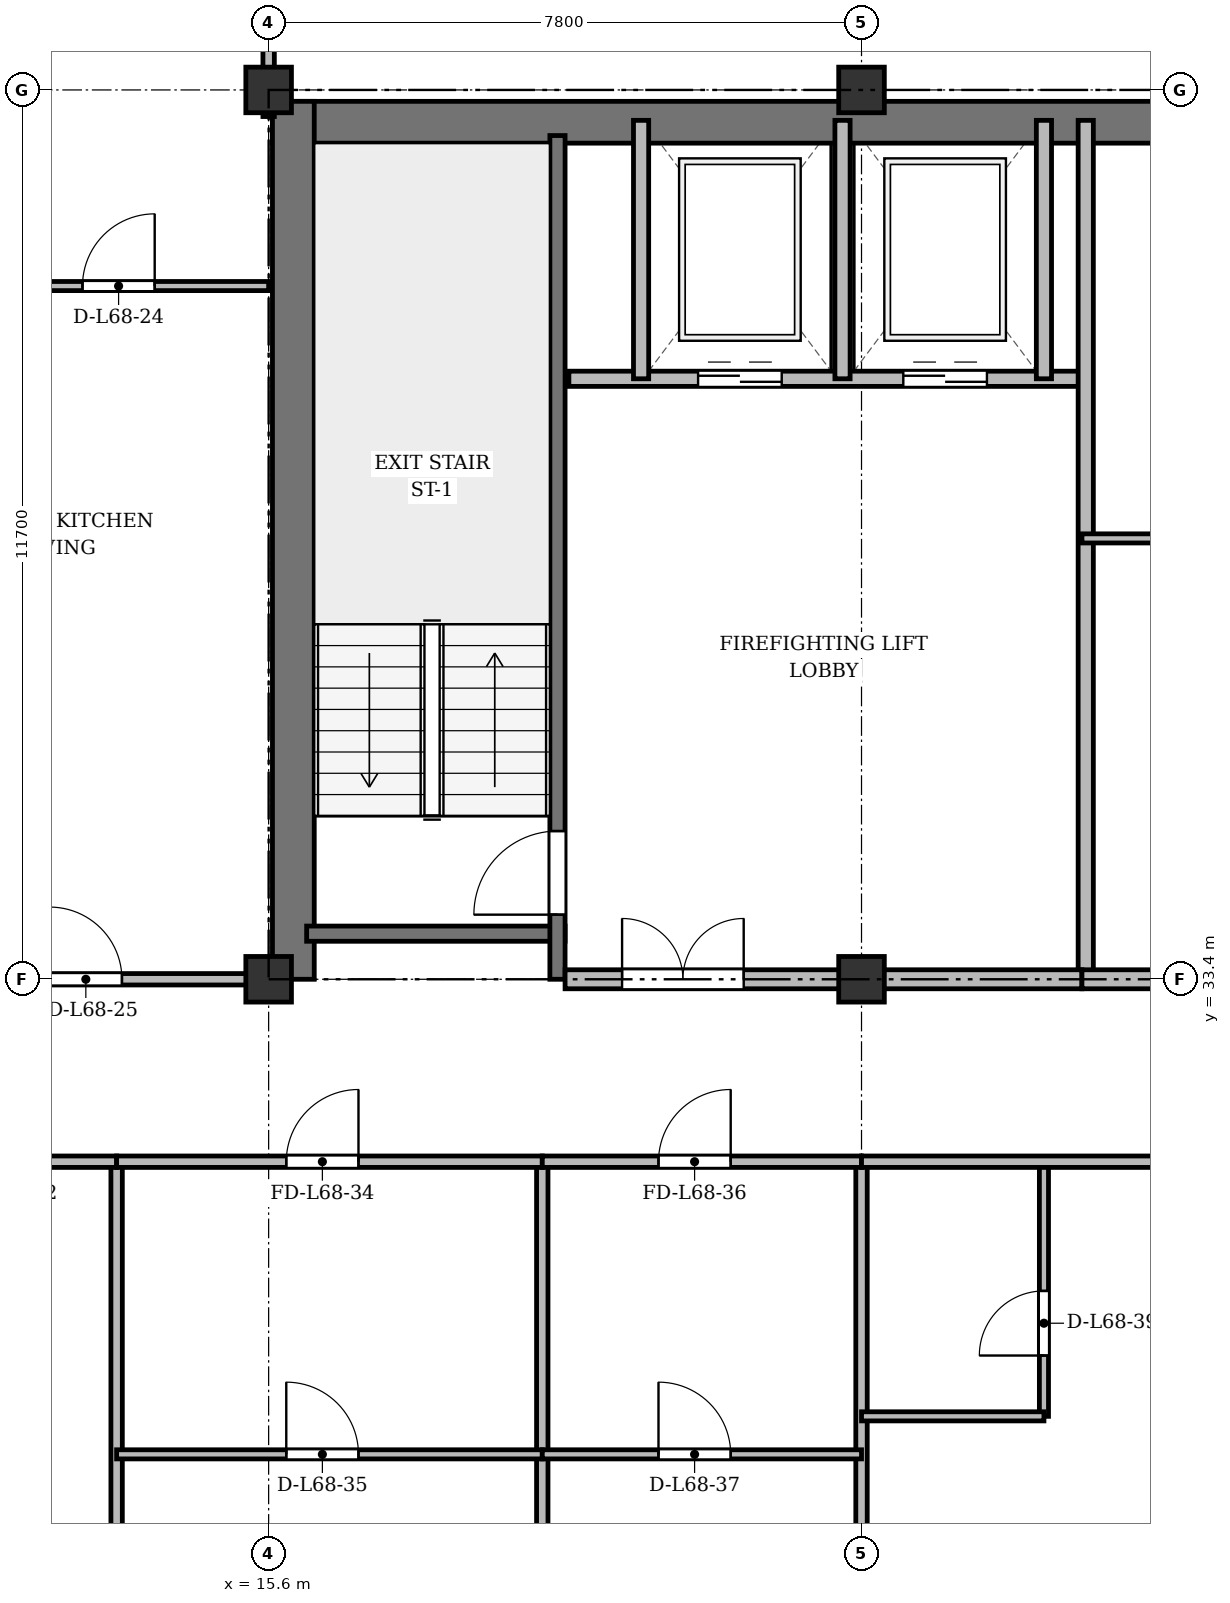
"""IFC4 building model, lengths in metres.
Left out: names, types, materials, properties, quantities, classifications, styles, units other than length and angle.
Written with IfcOpenShell. Run it as: python <this file> out.ifc"""

import sys

from ifc_helpers import new_model, si_unit, direction, frame, frame_2d, origin, origin_2d, place, context, subcontext, project, spatial, rectangle, extrude, source, transform, mapped, element, fill, save


model = new_model("IFC4")
c1 = context("Model", 3, precision=1e-05, world=origin(), true_north=direction((0.0, 1.0)))
c2 = subcontext(c1, "Body", "Model", "MODEL_VIEW")
j1 = project(units=[si_unit("LENGTHUNIT", "METRE"), si_unit("PLANEANGLEUNIT", "RADIAN")], contexts=[c1])
p1 = place(None, origin())
s1 = spatial("IfcSite", under=j1, at=p1, CompositionType="ELEMENT")
p2 = place(p1, origin())
s2 = spatial("IfcBuilding", under=s1, at=p2, CompositionType="ELEMENT")
p3 = place(p2, frame((0.0, 0.0, 263.1)))
s3 = spatial("IfcBuildingStorey", under=s2, at=p3, CompositionType="ELEMENT", Elevation=263.1)
m1 = source(origin(), c2, "Body", "SweptSolid", [
    extrude(rectangle(XDim=0.6, YDim=0.6, at=origin_2d()), origin(), (0.0, 0.0, 1.0), 3.6),
])
for number, where, z_axis, x_axis in (
    (1, (15.6, 33.4, 0.0), (0.0, 0.0, 1.0), (1.0, 0.0, 0.0)),
    (2, (15.6, 45.1, 0.0), (0.0, 0.0, 1.0), (1.0, 0.0, 0.0)),
    (3, (23.4, 33.4, 0.0), (0.0, 0.0, 1.0), (1.0, 0.0, 0.0)),
    (4, (23.4, 45.1, 0.0), (0.0, 0.0, 1.0), (1.0, 0.0, 0.0)),
):
    element("IfcColumn", number, at=place(p3, frame(where, z_axis=z_axis, x_axis=x_axis)), inside=s3, PredefinedType="COLUMN", context=c2, shape_type="MappedRepresentation", body=[
        mapped(m1, transform((0.0, 0.0, 0.0), x_axis=(1.0, 0.0, 0.0), y_axis=(0.0, 1.0, 0.0), z_axis=(0.0, 0.0, 1.0), scale=1.0)),
    ])
p4 = place(p3, frame((15.65, 44.675, 0.0), z_axis=(0.0, 0.0, 1.0), x_axis=(1.0, 0.0, 0.0)))
e5 = element("IfcWall", 5, at=p4, inside=s3, PredefinedType="SHEAR", context=c2, shape_type="SweptSolid", body=[
    extrude(rectangle(XDim=43.1, YDim=0.55, at=frame_2d((21.55, 0.0))), origin(), (0.0, 0.0, 1.0), 3.37),
])
p5 = place(p3, frame((15.925, 33.4, 0.0), z_axis=(0.0, 0.0, 1.0), x_axis=(0.0, 1.0, 0.0)))
e6 = element("IfcWall", 6, at=p5, inside=s3, PredefinedType="SHEAR", context=c2, shape_type="SweptSolid", body=[
    extrude(rectangle(XDim=11.55, YDim=0.55, at=frame_2d((5.775, 0.0))), origin(), (0.0, 0.0, 1.0), 3.37),
])
p6 = place(p3, frame((16.1, 34.0, 0.0), z_axis=(0.0, 0.0, 1.0), x_axis=(1.0, 0.0, 0.0)))
e7 = element("IfcWall", 7, at=p6, inside=s3, PredefinedType="SHEAR", context=c2, shape_type="SweptSolid", body=[
    extrude(rectangle(XDim=3.4, YDim=0.2, at=frame_2d((1.7, 0.0))), origin(), (0.0, 0.0, 1.0), 3.37),
])
p7 = place(p3, frame((19.4, 33.4, 0.0), z_axis=(0.0, 0.0, 1.0), x_axis=(0.0, 1.0, 0.0)))
e8 = element("IfcWall", 8, at=p7, inside=s3, PredefinedType="SHEAR", context=c2, shape_type="SweptSolid", body=[
    extrude(rectangle(XDim=11.1, YDim=0.2, at=frame_2d((5.55, 0.0))), origin(), (0.0, 0.0, 1.0), 3.37),
])
p8 = place(p7, frame((0.85, 0.0, 0.0)))
e9 = element("IfcOpeningElement", 9, at=p8, cuts=e8, PredefinedType="OPENING", context=c2, shape_type="SweptSolid", body=[
    extrude(rectangle(XDim=1.1, YDim=2.15, at=frame_2d((0.55, 1.075))), frame((0.0, 0.11, 0.0), z_axis=(0.0, -1.0, 0.0), x_axis=(1.0, 0.0, 0.0)), (0.0, 0.0, 1.0), 0.22),
])
p9 = place(p3, frame((19.55, 41.3, 0.0), z_axis=(0.0, 0.0, 1.0), x_axis=(1.0, 0.0, 0.0)))
e10 = element("IfcWall", 10, at=p9, inside=s3, PredefinedType="SOLIDWALL", context=c2, shape_type="SweptSolid", body=[
    extrude(rectangle(XDim=6.75, YDim=0.2, at=frame_2d((3.375, 0.0))), origin(), (0.0, 0.0, 1.0), 3.37),
])
p10 = place(p9, frame((1.7, 0.0, 0.0)))
e11 = element("IfcOpeningElement", 11, at=p10, cuts=e10, PredefinedType="OPENING", context=c2, shape_type="SweptSolid", body=[
    extrude(rectangle(XDim=1.1, YDim=2.15, at=frame_2d((0.55, 1.075))), frame((0.0, 0.11, 0.0), z_axis=(0.0, -1.0, 0.0), x_axis=(1.0, 0.0, 0.0)), (0.0, 0.0, 1.0), 0.22),
])
p11 = place(p9, frame((4.4, 0.0, 0.0)))
e12 = element("IfcOpeningElement", 12, at=p11, cuts=e10, PredefinedType="OPENING", context=c2, shape_type="SweptSolid", body=[
    extrude(rectangle(XDim=1.1, YDim=2.15, at=frame_2d((0.55, 1.075))), frame((0.0, 0.11, 0.0), z_axis=(0.0, -1.0, 0.0), x_axis=(1.0, 0.0, 0.0)), (0.0, 0.0, 1.0), 0.22),
])
for number, where, z_axis, x_axis in (
    (13, (20.5, 41.3, 0.0), (0.0, 0.0, 1.0), (0.0, 1.0, 0.0)),
    (14, (23.15, 41.3, 0.0), (0.0, 0.0, 1.0), (0.0, 1.0, 0.0)),
    (15, (25.8, 41.3, 0.0), (0.0, 0.0, 1.0), (0.0, 1.0, 0.0)),
):
    element("IfcWall", number, at=place(p3, frame(where, z_axis=z_axis, x_axis=x_axis)), inside=s3, PredefinedType="SOLIDWALL", context=c2, shape_type="SweptSolid", body=[
        extrude(rectangle(XDim=3.4, YDim=0.2, at=frame_2d((1.7, 0.0))), origin(), (0.0, 0.0, 1.0), 3.37),
    ])
p12 = place(p3, frame((26.35, 33.4, 0.0), z_axis=(0.0, 0.0, 1.0), x_axis=(0.0, 1.0, 0.0)))
e16 = element("IfcWall", 16, at=p12, inside=s3, PredefinedType="SOLIDWALL", context=c2, shape_type="SweptSolid", body=[
    extrude(rectangle(XDim=11.3, YDim=0.2, at=frame_2d((5.65, 0.0))), origin(), (0.0, 0.0, 1.0), 2.92),
])
p13 = place(p3, frame((19.5, 33.4, 0.0), z_axis=(0.0, 0.0, 1.0), x_axis=(1.0, 0.0, 0.0)))
e17 = element("IfcWall", 17, at=p13, inside=s3, PredefinedType="PARTITIONING", context=c2, shape_type="SweptSolid", body=[
    extrude(rectangle(XDim=6.8, YDim=0.25, at=frame_2d((3.4, 0.0))), origin(), (0.0, 0.0, 1.0), 2.92),
])
p14 = place(p13, frame((0.75, 0.0, 0.0)))
e18 = element("IfcOpeningElement", 18, at=p14, cuts=e17, PredefinedType="OPENING", context=c2, shape_type="SweptSolid", body=[
    extrude(rectangle(XDim=1.6, YDim=2.2, at=frame_2d((0.8, 1.1))), frame((0.0, 0.135, 0.0), z_axis=(0.0, -1.0, 0.0), x_axis=(1.0, 0.0, 0.0)), (0.0, 0.0, 1.0), 0.27),
])
p15 = place(p3, frame((26.3, 39.2, 0.0), z_axis=(0.0, 0.0, 1.0), x_axis=(1.0, 0.0, 0.0)))
e19 = element("IfcWall", 19, at=p15, inside=s3, PredefinedType="PARTITIONING", context=c2, shape_type="SweptSolid", body=[
    extrude(rectangle(XDim=7.0, YDim=0.12, at=frame_2d((3.5, 0.0))), origin(), (0.0, 0.0, 1.0), 2.87),
])
p16 = place(p15, frame((2.6, 0.0, 0.0)))
e20 = element("IfcOpeningElement", 20, at=p16, cuts=e19, PredefinedType="OPENING", context=c2, shape_type="SweptSolid", body=[
    extrude(rectangle(XDim=0.95, YDim=2.15, at=frame_2d((0.475, 1.075))), frame((0.0, 0.07, 0.0), z_axis=(0.0, -1.0, 0.0), x_axis=(1.0, 0.0, 0.0)), (0.0, 0.0, 1.0), 0.14),
])
p17 = place(p3, frame((26.3, 33.4, 0.0), z_axis=(0.0, 0.0, 1.0), x_axis=(1.0, 0.0, 0.0)))
e21 = element("IfcWall", 21, at=p17, inside=s3, PredefinedType="PARTITIONING", context=c2, shape_type="SweptSolid", body=[
    extrude(rectangle(XDim=7.0, YDim=0.25, at=frame_2d((3.5, 0.0))), origin(), (0.0, 0.0, 1.0), 2.92),
])
p18 = place(p17, frame((1.35, 0.0, 0.0)))
e22 = element("IfcOpeningElement", 22, at=p18, cuts=e21, PredefinedType="OPENING", context=c2, shape_type="SweptSolid", body=[
    extrude(rectangle(XDim=0.95, YDim=2.15, at=frame_2d((0.475, 1.075))), frame((0.0, 0.135, 0.0), z_axis=(0.0, -1.0, 0.0), x_axis=(1.0, 0.0, 0.0)), (0.0, 0.0, 1.0), 0.27),
])
p19 = place(p3, frame((12.025, 42.52, 0.0), z_axis=(0.0, 0.0, 1.0), x_axis=(1.0, 0.0, 0.0)))
e23 = element("IfcWall", 23, at=p19, inside=s3, PredefinedType="PARTITIONING", context=c2, shape_type="SweptSolid", body=[
    extrude(rectangle(XDim=3.575, YDim=0.12, at=frame_2d((1.788, 0.0))), origin(), (0.0, 0.0, 1.0), 2.87),
])
p20 = place(p19, frame((1.126, 0.0, 0.0)))
e24 = element("IfcOpeningElement", 24, at=p20, cuts=e23, PredefinedType="OPENING", context=c2, shape_type="SweptSolid", body=[
    extrude(rectangle(XDim=0.95, YDim=2.15, at=frame_2d((0.475, 1.075))), frame((0.0, 0.07, 0.0), z_axis=(0.0, -1.0, 0.0), x_axis=(1.0, 0.0, 0.0)), (0.0, 0.0, 1.0), 0.14),
])
p21 = place(p3, frame((8.45, 33.4, 0.0), z_axis=(0.0, 0.0, 1.0), x_axis=(1.0, 0.0, 0.0)))
e25 = element("IfcWall", 25, at=p21, inside=s3, PredefinedType="PARTITIONING", context=c2, shape_type="SweptSolid", body=[
    extrude(rectangle(XDim=7.15, YDim=0.15, at=frame_2d((3.575, 0.0))), origin(), (0.0, 0.0, 1.0), 2.92),
])
p22 = place(p21, frame((4.27, 0.0, 0.0)))
e26 = element("IfcOpeningElement", 26, at=p22, cuts=e25, PredefinedType="OPENING", context=c2, shape_type="SweptSolid", body=[
    extrude(rectangle(XDim=0.95, YDim=2.15, at=frame_2d((0.475, 1.075))), frame((0.0, 0.085, 0.0), z_axis=(0.0, -1.0, 0.0), x_axis=(1.0, 0.0, 0.0)), (0.0, 0.0, 1.0), 0.17),
])
p23 = place(p3, frame((15.6, 44.75, 0.0), z_axis=(0.0, 0.0, 1.0), x_axis=(0.0, 1.0, 0.0)))
e27 = element("IfcWall", 27, at=p23, inside=s3, PredefinedType="PARTITIONING", context=c2, shape_type="SweptSolid", body=[
    extrude(rectangle(XDim=3.61, YDim=0.15, at=frame_2d((1.805, 0.0))), origin(), (0.0, 0.0, 1.0), 2.87),
])
p24 = place(p23, frame((1.1, 0.0, 0.0)))
e28 = element("IfcOpeningElement", 28, at=p24, cuts=e27, PredefinedType="OPENING", context=c2, shape_type="SweptSolid", body=[
    extrude(rectangle(XDim=0.95, YDim=2.15, at=frame_2d((0.475, 1.075))), frame((0.0, 0.085, 0.0), z_axis=(0.0, -1.0, 0.0), x_axis=(1.0, 0.0, 0.0)), (0.0, 0.0, 1.0), 0.17),
])
for number, where, z_axis, x_axis in (
    (29, (13.6, 3.725, 0.0), (0.0, 0.0, 1.0), (0.0, 1.0, 0.0)),
    (30, (19.2, 3.725, 0.0), (0.0, 0.0, 1.0), (0.0, 1.0, 0.0)),
):
    element("IfcWall", number, at=place(p3, frame(where, z_axis=z_axis, x_axis=x_axis)), inside=s3, PredefinedType="PARTITIONING", context=c2, shape_type="SweptSolid", body=[
        extrude(rectangle(XDim=27.275, YDim=0.15, at=frame_2d((13.637, 0.0))), origin(), (0.0, 0.0, 1.0), 2.92),
    ])
p25 = place(p3, frame((23.4, 3.725, 0.0), z_axis=(0.0, 0.0, 1.0), x_axis=(0.0, 1.0, 0.0)))
e31 = element("IfcWall", 31, at=p25, inside=s3, PredefinedType="PARTITIONING", context=c2, shape_type="SweptSolid", body=[
    extrude(rectangle(XDim=27.275, YDim=0.15, at=frame_2d((13.637, 0.0))), origin(), (0.0, 0.0, 1.0), 2.87),
])
p26 = place(p3, frame((8.425, 31.0, 0.0), z_axis=(0.0, 0.0, 1.0), x_axis=(1.0, 0.0, 0.0)))
e32 = element("IfcWall", 32, at=p26, inside=s3, PredefinedType="PARTITIONING", context=c2, shape_type="SweptSolid", body=[
    extrude(rectangle(XDim=5.175, YDim=0.15, at=frame_2d((2.587, 0.0))), origin(), (0.0, 0.0, 1.0), 2.87),
])
p27 = place(p26, frame((3.244, 0.0, 0.0)))
e33 = element("IfcOpeningElement", 33, at=p27, cuts=e32, PredefinedType="OPENING", context=c2, shape_type="SweptSolid", body=[
    extrude(rectangle(XDim=0.95, YDim=2.15, at=frame_2d((0.475, 1.075))), frame((0.0, 0.085, 0.0), z_axis=(0.0, -1.0, 0.0), x_axis=(1.0, 0.0, 0.0)), (0.0, 0.0, 1.0), 0.17),
])
p28 = place(p3, frame((13.6, 31.0, 0.0), z_axis=(0.0, 0.0, 1.0), x_axis=(1.0, 0.0, 0.0)))
e34 = element("IfcWall", 34, at=p28, inside=s3, PredefinedType="PARTITIONING", context=c2, shape_type="SweptSolid", body=[
    extrude(rectangle(XDim=5.6, YDim=0.15, at=frame_2d((2.8, 0.0))), origin(), (0.0, 0.0, 1.0), 2.87),
])
p29 = place(p28, frame((2.232, 0.0, 0.0)))
e35 = element("IfcOpeningElement", 35, at=p29, cuts=e34, PredefinedType="OPENING", context=c2, shape_type="SweptSolid", body=[
    extrude(rectangle(XDim=0.95, YDim=2.15, at=frame_2d((0.475, 1.075))), frame((0.0, 0.085, 0.0), z_axis=(0.0, -1.0, 0.0), x_axis=(1.0, 0.0, 0.0)), (0.0, 0.0, 1.0), 0.17),
])
p30 = place(p3, frame((13.6, 27.15, 0.0), z_axis=(0.0, 0.0, 1.0), x_axis=(1.0, 0.0, 0.0)))
e36 = element("IfcWall", 36, at=p30, inside=s3, PredefinedType="PARTITIONING", context=c2, shape_type="SweptSolid", body=[
    extrude(rectangle(XDim=5.6, YDim=0.12, at=frame_2d((2.8, 0.0))), origin(), (0.0, 0.0, 1.0), 2.87),
])
p31 = place(p30, frame((2.232, 0.0, 0.0)))
e37 = element("IfcOpeningElement", 37, at=p31, cuts=e36, PredefinedType="OPENING", context=c2, shape_type="SweptSolid", body=[
    extrude(rectangle(XDim=0.95, YDim=2.15, at=frame_2d((0.475, 1.075))), frame((0.0, 0.07, 0.0), z_axis=(0.0, -1.0, 0.0), x_axis=(1.0, 0.0, 0.0)), (0.0, 0.0, 1.0), 0.14),
])
p32 = place(p3, frame((19.2, 31.0, 0.0), z_axis=(0.0, 0.0, 1.0), x_axis=(1.0, 0.0, 0.0)))
e38 = element("IfcWall", 38, at=p32, inside=s3, PredefinedType="PARTITIONING", context=c2, shape_type="SweptSolid", body=[
    extrude(rectangle(XDim=4.2, YDim=0.15, at=frame_2d((2.1, 0.0))), origin(), (0.0, 0.0, 1.0), 2.87),
])
p33 = place(p32, frame((1.529, 0.0, 0.0)))
e39 = element("IfcOpeningElement", 39, at=p33, cuts=e38, PredefinedType="OPENING", context=c2, shape_type="SweptSolid", body=[
    extrude(rectangle(XDim=0.95, YDim=2.15, at=frame_2d((0.475, 1.075))), frame((0.0, 0.085, 0.0), z_axis=(0.0, -1.0, 0.0), x_axis=(1.0, 0.0, 0.0)), (0.0, 0.0, 1.0), 0.17),
])
p34 = place(p3, frame((19.2, 27.15, 0.0), z_axis=(0.0, 0.0, 1.0), x_axis=(1.0, 0.0, 0.0)))
e40 = element("IfcWall", 40, at=p34, inside=s3, PredefinedType="PARTITIONING", context=c2, shape_type="SweptSolid", body=[
    extrude(rectangle(XDim=4.2, YDim=0.12, at=frame_2d((2.1, 0.0))), origin(), (0.0, 0.0, 1.0), 2.87),
])
p35 = place(p34, frame((1.529, 0.0, 0.0)))
e41 = element("IfcOpeningElement", 41, at=p35, cuts=e40, PredefinedType="OPENING", context=c2, shape_type="SweptSolid", body=[
    extrude(rectangle(XDim=0.95, YDim=2.15, at=frame_2d((0.475, 1.075))), frame((0.0, 0.07, 0.0), z_axis=(0.0, -1.0, 0.0), x_axis=(1.0, 0.0, 0.0)), (0.0, 0.0, 1.0), 0.14),
])
p36 = place(p3, frame((25.8, 27.65, 0.0), z_axis=(0.0, 0.0, 1.0), x_axis=(0.0, 1.0, 0.0)))
e42 = element("IfcWall", 42, at=p36, inside=s3, PredefinedType="PARTITIONING", context=c2, shape_type="SweptSolid", body=[
    extrude(rectangle(XDim=3.35, YDim=0.12, at=frame_2d((1.675, 0.0))), origin(), (0.0, 0.0, 1.0), 3.37),
])
p37 = place(p36, frame((0.8, 0.0, 0.0)))
e43 = element("IfcOpeningElement", 43, at=p37, cuts=e42, PredefinedType="OPENING", context=c2, shape_type="SweptSolid", body=[
    extrude(rectangle(XDim=0.85, YDim=2.1, at=frame_2d((0.425, 1.05))), frame((0.0, 0.07, 0.0), z_axis=(0.0, -1.0, 0.0), x_axis=(1.0, 0.0, 0.0)), (0.0, 0.0, 1.0), 0.14),
])
p38 = place(p3, frame((23.4, 27.65, 0.0), z_axis=(0.0, 0.0, 1.0), x_axis=(1.0, 0.0, 0.0)))
e44 = element("IfcWall", 44, at=p38, inside=s3, PredefinedType="PARTITIONING", context=c2, shape_type="SweptSolid", body=[
    extrude(rectangle(XDim=2.4, YDim=0.12, at=frame_2d((1.2, 0.0))), origin(), (0.0, 0.0, 1.0), 2.87),
])
p39 = place(p3, frame((23.4, 31.0, 0.0), z_axis=(0.0, 0.0, 1.0), x_axis=(1.0, 0.0, 0.0)))
e45 = element("IfcWall", 45, at=p39, inside=s3, PredefinedType="PARTITIONING", context=c2, shape_type="SweptSolid", body=[
    extrude(rectangle(XDim=7.2, YDim=0.15, at=frame_2d((3.6, 0.0))), origin(), (0.0, 0.0, 1.0), 2.87),
])
p40 = place(p39, frame((4.706, 0.0, 0.0)))
e46 = element("IfcOpeningElement", 46, at=p40, cuts=e45, PredefinedType="OPENING", context=c2, shape_type="SweptSolid", body=[
    extrude(rectangle(XDim=0.95, YDim=2.15, at=frame_2d((0.475, 1.075))), frame((0.0, 0.085, 0.0), z_axis=(0.0, -1.0, 0.0), x_axis=(1.0, 0.0, 0.0)), (0.0, 0.0, 1.0), 0.17),
])
m2 = source(origin(), c2, "Body", "SweptSolid", [
    extrude(rectangle(XDim=1.1, YDim=2.15, at=frame_2d((0.55, 1.075))), frame((0.0, 0.025, 0.0), z_axis=(0.0, -1.0, 0.0), x_axis=(1.0, 0.0, 0.0)), (0.0, 0.0, 1.0), 0.05),
])
p41 = place(p8, origin())
e47 = element("IfcDoor", 47, at=p41, inside=s3, OperationType="SINGLE_SWING_LEFT", PredefinedType="DOOR", context=c2, shape_type="MappedRepresentation", body=[
    mapped(m2, transform((0.0, 0.0, 0.0), x_axis=(1.0, 0.0, 0.0), y_axis=(0.0, 1.0, 0.0), z_axis=(0.0, 0.0, 1.0), scale=1.0)),
])
fill(e9, e47)
p42 = place(p10, origin())
e48 = element("IfcDoor", 48, at=p42, inside=s3, OperationType="DOUBLE_DOOR_SLIDING", PredefinedType="DOOR", context=c2, shape_type="MappedRepresentation", body=[
    mapped(m2, transform((0.0, 0.0, 0.0), x_axis=(1.0, 0.0, 0.0), y_axis=(0.0, 1.0, 0.0), z_axis=(0.0, 0.0, 1.0), scale=1.0)),
])
fill(e11, e48)
p43 = place(p11, origin())
e49 = element("IfcDoor", 49, at=p43, inside=s3, OperationType="DOUBLE_DOOR_SLIDING", PredefinedType="DOOR", context=c2, shape_type="MappedRepresentation", body=[
    mapped(m2, transform((0.0, 0.0, 0.0), x_axis=(1.0, 0.0, 0.0), y_axis=(0.0, 1.0, 0.0), z_axis=(0.0, 0.0, 1.0), scale=1.0)),
])
fill(e12, e49)
m3 = source(origin(), c2, "Body", "SweptSolid", [
    extrude(rectangle(XDim=1.6, YDim=2.2, at=frame_2d((0.8, 1.1))), frame((0.0, 0.025, 0.0), z_axis=(0.0, -1.0, 0.0), x_axis=(1.0, 0.0, 0.0)), (0.0, 0.0, 1.0), 0.05),
])
p44 = place(p14, origin())
e50 = element("IfcDoor", 50, at=p44, inside=s3, OperationType="DOUBLE_DOOR_SINGLE_SWING", PredefinedType="DOOR", context=c2, shape_type="MappedRepresentation", body=[
    mapped(m3, transform((0.0, 0.0, 0.0), x_axis=(1.0, 0.0, 0.0), y_axis=(0.0, 1.0, 0.0), z_axis=(0.0, 0.0, 1.0), scale=1.0)),
])
fill(e18, e50)
m4 = source(origin(), c2, "Body", "SweptSolid", [
    extrude(rectangle(XDim=0.95, YDim=2.15, at=frame_2d((0.475, 1.075))), frame((0.0, 0.025, 0.0), z_axis=(0.0, -1.0, 0.0), x_axis=(1.0, 0.0, 0.0)), (0.0, 0.0, 1.0), 0.05),
])
p45 = place(p20, origin())
e51 = element("IfcDoor", 51, at=p45, inside=s3, OperationType="SINGLE_SWING_RIGHT", PredefinedType="DOOR", context=c2, shape_type="MappedRepresentation", body=[
    mapped(m4, transform((0.0, 0.0, 0.0), x_axis=(1.0, 0.0, 0.0), y_axis=(0.0, 1.0, 0.0), z_axis=(0.0, 0.0, 1.0), scale=1.0)),
])
fill(e24, e51)
p46 = place(p22, origin())
e52 = element("IfcDoor", 52, at=p46, inside=s3, OperationType="SINGLE_SWING_LEFT", PredefinedType="DOOR", context=c2, shape_type="MappedRepresentation", body=[
    mapped(m4, transform((0.0, 0.0, 0.0), x_axis=(1.0, 0.0, 0.0), y_axis=(0.0, 1.0, 0.0), z_axis=(0.0, 0.0, 1.0), scale=1.0)),
])
fill(e26, e52)
p47 = place(p29, origin())
e53 = element("IfcDoor", 53, at=p47, inside=s3, OperationType="SINGLE_SWING_RIGHT", PredefinedType="DOOR", context=c2, shape_type="MappedRepresentation", body=[
    mapped(m4, transform((0.0, 0.0, 0.0), x_axis=(1.0, 0.0, 0.0), y_axis=(0.0, 1.0, 0.0), z_axis=(0.0, 0.0, 1.0), scale=1.0)),
])
fill(e35, e53)
p48 = place(p31, origin())
e54 = element("IfcDoor", 54, at=p48, inside=s3, OperationType="SINGLE_SWING_LEFT", PredefinedType="DOOR", context=c2, shape_type="MappedRepresentation", body=[
    mapped(m4, transform((0.0, 0.0, 0.0), x_axis=(1.0, 0.0, 0.0), y_axis=(0.0, 1.0, 0.0), z_axis=(0.0, 0.0, 1.0), scale=1.0)),
])
fill(e37, e54)
p49 = place(p33, origin())
e55 = element("IfcDoor", 55, at=p49, inside=s3, OperationType="SINGLE_SWING_RIGHT", PredefinedType="DOOR", context=c2, shape_type="MappedRepresentation", body=[
    mapped(m4, transform((0.0, 0.0, 0.0), x_axis=(1.0, 0.0, 0.0), y_axis=(0.0, 1.0, 0.0), z_axis=(0.0, 0.0, 1.0), scale=1.0)),
])
fill(e39, e55)
p50 = place(p35, origin())
e56 = element("IfcDoor", 56, at=p50, inside=s3, OperationType="SINGLE_SWING_LEFT", PredefinedType="DOOR", context=c2, shape_type="MappedRepresentation", body=[
    mapped(m4, transform((0.0, 0.0, 0.0), x_axis=(1.0, 0.0, 0.0), y_axis=(0.0, 1.0, 0.0), z_axis=(0.0, 0.0, 1.0), scale=1.0)),
])
fill(e41, e56)
m5 = source(origin(), c2, "Body", "SweptSolid", [
    extrude(rectangle(XDim=0.85, YDim=2.1, at=frame_2d((0.425, 1.05))), frame((0.0, 0.025, 0.0), z_axis=(0.0, -1.0, 0.0), x_axis=(1.0, 0.0, 0.0)), (0.0, 0.0, 1.0), 0.05),
])
p51 = place(p37, origin())
e57 = element("IfcDoor", 57, at=p51, inside=s3, OperationType="SINGLE_SWING_LEFT", PredefinedType="DOOR", context=c2, shape_type="MappedRepresentation", body=[
    mapped(m5, transform((0.0, 0.0, 0.0), x_axis=(1.0, 0.0, 0.0), y_axis=(0.0, 1.0, 0.0), z_axis=(0.0, 0.0, 1.0), scale=1.0)),
])
fill(e43, e57)
save(model, sys.argv[1])
